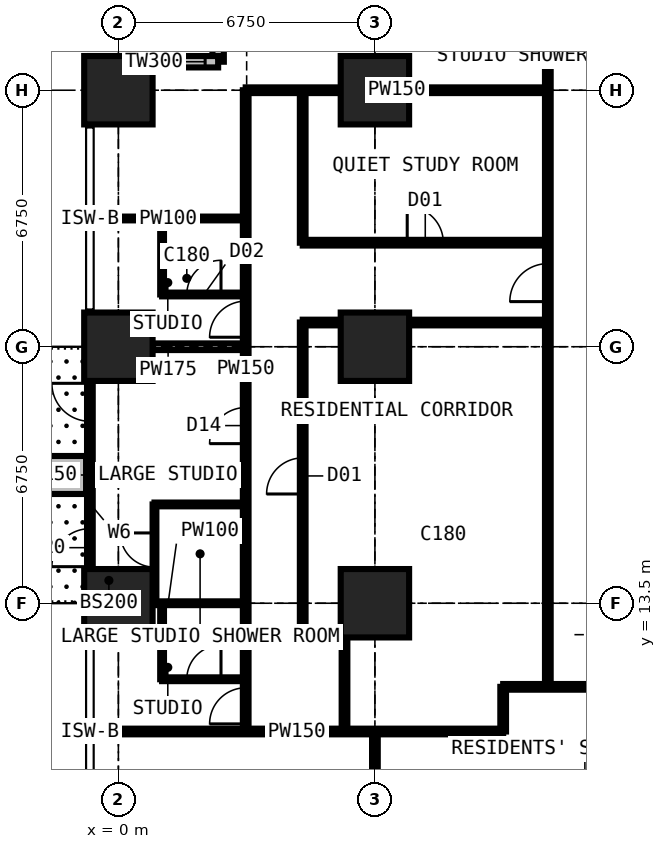
"""IFC4 building model, lengths in metres.
Left out: names, types, materials, properties, quantities, classifications, styles, units other than length and angle.
Written with IfcOpenShell. Run it as: python <this file> out.ifc"""

import sys

from ifc_helpers import new_model, si_unit, direction, frame, frame_2d, origin, origin_2d, place, context, subcontext, project, spatial, rectangle, extrude, element, fill, save


model = new_model("IFC4")
c1 = context("Model", 3, precision=1e-05, world=origin(), true_north=direction((0.0, 1.0)))
c2 = subcontext(c1, "Body", "Model", "MODEL_VIEW")
j1 = project(units=[si_unit("LENGTHUNIT", "METRE"), si_unit("PLANEANGLEUNIT", "RADIAN")], contexts=[c1])
p1 = place(None, origin())
s1 = spatial("IfcSite", under=j1, at=p1, CompositionType="ELEMENT")
p2 = place(p1, origin())
s2 = spatial("IfcBuilding", under=s1, at=p2, CompositionType="ELEMENT")
p3 = place(p2, frame((0.0, 0.0, 87.3)))
s3 = spatial("IfcBuildingStorey", under=s2, at=p3, CompositionType="ELEMENT", Elevation=87.3)
for number, where, z_axis, x_axis in (
    (1, (0.0, 13.5, 0.0), (0.0, 0.0, 1.0), (1.0, 0.0, 0.0)),
    (2, (0.0, 20.25, 0.0), (0.0, 0.0, 1.0), (1.0, 0.0, 0.0)),
    (3, (0.0, 27.0, 0.0), (0.0, 0.0, 1.0), (1.0, 0.0, 0.0)),
    (4, (6.75, 13.5, 0.0), (0.0, 0.0, 1.0), (1.0, 0.0, 0.0)),
    (5, (6.75, 20.25, 0.0), (0.0, 0.0, 1.0), (1.0, 0.0, 0.0)),
    (6, (6.75, 27.0, 0.0), (0.0, 0.0, 1.0), (1.0, 0.0, 0.0)),
):
    element("IfcColumn", number, at=place(p3, frame(where, z_axis=z_axis, x_axis=x_axis)), inside=s3, PredefinedType="COLUMN", context=c2, shape_type="SweptSolid", body=[
        extrude(rectangle(XDim=1.8, YDim=1.8, at=origin_2d()), origin(), (0.0, 0.0, 1.0), 3.6),
    ])
p4 = place(p3, frame((2.625, 31.125, 0.0), z_axis=(0.0, 0.0, 1.0), x_axis=(0.0, -1.0, 0.0)))
e7 = element("IfcWall", 7, at=p4, inside=s3, PredefinedType="SOLIDWALL", context=c2, shape_type="SweptSolid", body=[
    extrude(rectangle(XDim=3.375, YDim=0.3, at=frame_2d((1.688, 0.0))), origin(), (0.0, 0.0, 1.0), 3.375),
])
p5 = place(p4, frame((0.788, 0.0, 0.6)))
e8 = element("IfcOpeningElement", 8, at=p5, cuts=e7, PredefinedType="OPENING", context=c2, shape_type="SweptSolid", body=[
    extrude(rectangle(XDim=1.8, YDim=2.1, at=frame_2d((0.9, 1.05))), frame((0.0, 0.16, 0.0), z_axis=(0.0, -1.0, 0.0), x_axis=(1.0, 0.0, 0.0)), (0.0, 0.0, 1.0), 0.32),
])
p6 = place(p3, frame((2.625, 27.75, 0.0), z_axis=(0.0, 0.0, 1.0), x_axis=(-1.0, 0.0, 0.0)))
e9 = element("IfcWall", 9, at=p6, inside=s3, PredefinedType="SOLIDWALL", context=c2, shape_type="SweptSolid", body=[
    extrude(rectangle(XDim=3.375, YDim=0.3, at=frame_2d((1.688, 0.0))), origin(), (0.0, 0.0, 1.0), 3.375),
])
p7 = place(p6, frame((0.343, 0.0, 0.9)))
e10 = element("IfcOpeningElement", 10, at=p7, cuts=e9, PredefinedType="OPENING", context=c2, shape_type="SweptSolid", body=[
    extrude(rectangle(XDim=1.2, YDim=1.8, at=frame_2d((0.6, 0.9))), frame((0.0, 0.16, 0.0), z_axis=(0.0, -1.0, 0.0), x_axis=(1.0, 0.0, 0.0)), (0.0, 0.0, 1.0), 0.32),
])
p8 = place(p3, frame((-0.75, 13.5, 0.0), z_axis=(0.0, 0.0, 1.0), x_axis=(0.0, 1.0, 0.0)))
e11 = element("IfcWall", 11, at=p8, inside=s3, PredefinedType="SOLIDWALL", context=c2, shape_type="SweptSolid", body=[
    extrude(rectangle(XDim=6.75, YDim=0.15, at=frame_2d((3.375, 0.0))), origin(), (0.0, 0.0, 1.0), 3.375),
])
p9 = place(p8, frame((0.962, 0.0, 0.0)))
e12 = element("IfcOpeningElement", 12, at=p9, cuts=e11, PredefinedType="OPENING", context=c2, shape_type="SweptSolid", body=[
    extrude(rectangle(XDim=1.0, YDim=2.2, at=frame_2d((0.5, 1.1))), frame((0.0, 0.085, 0.0), z_axis=(0.0, -1.0, 0.0), x_axis=(1.0, 0.0, 0.0)), (0.0, 0.0, 1.0), 0.17),
])
p10 = place(p8, frame((2.025, 0.0, 0.9)))
e13 = element("IfcOpeningElement", 13, at=p10, cuts=e11, PredefinedType="OPENING", context=c2, shape_type="SweptSolid", body=[
    extrude(rectangle(XDim=1.2, YDim=1.8, at=frame_2d((0.6, 0.9))), frame((0.0, 0.085, 0.0), z_axis=(0.0, -1.0, 0.0), x_axis=(1.0, 0.0, 0.0)), (0.0, 0.0, 1.0), 0.17),
])
p11 = place(p8, frame((4.788, 0.0, 0.0)))
e14 = element("IfcOpeningElement", 14, at=p11, cuts=e11, PredefinedType="OPENING", context=c2, shape_type="SweptSolid", body=[
    extrude(rectangle(XDim=1.0, YDim=2.2, at=frame_2d((0.5, 1.1))), frame((0.0, 0.085, 0.0), z_axis=(0.0, -1.0, 0.0), x_axis=(1.0, 0.0, 0.0)), (0.0, 0.0, 1.0), 0.17),
])
p12 = place(p8, frame((3.525, 0.0, 0.9)))
e15 = element("IfcOpeningElement", 15, at=p12, cuts=e11, PredefinedType="OPENING", context=c2, shape_type="SweptSolid", body=[
    extrude(rectangle(XDim=1.2, YDim=1.8, at=frame_2d((0.6, 0.9))), frame((0.0, 0.085, 0.0), z_axis=(0.0, -1.0, 0.0), x_axis=(1.0, 0.0, 0.0)), (0.0, 0.0, 1.0), 0.17),
])
p13 = place(p3, frame((-0.85, 16.875, 0.0), z_axis=(0.0, 0.0, 1.0), x_axis=(-1.0, 0.0, 0.0)))
e16 = element("IfcWall", 16, at=p13, inside=s3, PredefinedType="USERDEFINED", context=c2, shape_type="SweptSolid", body=[
    extrude(rectangle(XDim=2.2, YDim=1.0, at=frame_2d((1.1, 0.0))), origin(), (0.0, 0.0, 1.0), 0.9),
])
p14 = place(p3, frame((-0.734, 10.125, 0.0), z_axis=(0.0, 0.0, 1.0), x_axis=(1.0, 0.0, 0.0)))
e17 = element("IfcWall", 17, at=p14, inside=s3, PredefinedType="PARTITIONING", context=c2, shape_type="SweptSolid", body=[
    extrude(rectangle(XDim=10.859, YDim=0.15, at=frame_2d((5.429, 0.0))), origin(), (0.0, 0.0, 1.0), 3.375),
])
p15 = place(p3, frame((-0.734, 13.5, 0.0), z_axis=(0.0, 0.0, 1.0), x_axis=(1.0, 0.0, 0.0)))
e18 = element("IfcWall", 18, at=p15, inside=s3, PredefinedType="PARTITIONING", context=c2, shape_type="SweptSolid", body=[
    extrude(rectangle(XDim=4.084, YDim=0.1, at=frame_2d((2.042, 0.0))), origin(), (0.0, 0.0, 1.0), 2.877),
])
p16 = place(p3, frame((-0.734, 20.25, 0.0), z_axis=(0.0, 0.0, 1.0), x_axis=(1.0, 0.0, 0.0)))
e19 = element("IfcWall", 19, at=p16, inside=s3, PredefinedType="PARTITIONING", context=c2, shape_type="SweptSolid", body=[
    extrude(rectangle(XDim=4.084, YDim=0.175, at=frame_2d((2.042, 0.0))), origin(), (0.0, 0.0, 1.0), 2.877),
])
p17 = place(p3, frame((-0.734, 23.625, 0.0), z_axis=(0.0, 0.0, 1.0), x_axis=(1.0, 0.0, 0.0)))
e20 = element("IfcWall", 20, at=p17, inside=s3, PredefinedType="PARTITIONING", context=c2, shape_type="SweptSolid", body=[
    extrude(rectangle(XDim=4.084, YDim=0.1, at=frame_2d((2.042, 0.0))), origin(), (0.0, 0.0, 1.0), 3.375),
])
p18 = place(p3, frame((0.95, 13.5, 0.0), z_axis=(0.0, 0.0, 1.0), x_axis=(0.0, 1.0, 0.0)))
e21 = element("IfcWall", 21, at=p18, inside=s3, PredefinedType="PARTITIONING", context=c2, shape_type="SweptSolid", body=[
    extrude(rectangle(XDim=2.6, YDim=0.1, at=frame_2d((1.3, 0.0))), origin(), (0.0, 0.0, 1.0), 3.375),
])
p19 = place(p18, frame((0.95, 0.0, 0.0)))
e22 = element("IfcOpeningElement", 22, at=p19, cuts=e21, PredefinedType="OPENING", context=c2, shape_type="SweptSolid", body=[
    extrude(rectangle(XDim=0.9, YDim=2.2, at=frame_2d((0.45, 1.1))), frame((0.0, 0.06, 0.0), z_axis=(0.0, -1.0, 0.0), x_axis=(1.0, 0.0, 0.0)), (0.0, 0.0, 1.0), 0.12),
])
p20 = place(p3, frame((0.95, 16.1, 0.0), z_axis=(0.0, 0.0, 1.0), x_axis=(1.0, 0.0, 0.0)))
e23 = element("IfcWall", 23, at=p20, inside=s3, PredefinedType="PARTITIONING", context=c2, shape_type="SweptSolid", body=[
    extrude(rectangle(XDim=2.4, YDim=0.1, at=frame_2d((1.2, 0.0))), origin(), (0.0, 0.0, 1.0), 3.375),
])
p21 = place(p3, frame((1.15, 11.5, 0.0), z_axis=(0.0, 0.0, 1.0), x_axis=(0.0, 1.0, 0.0)))
e24 = element("IfcWall", 24, at=p21, inside=s3, PredefinedType="PARTITIONING", context=c2, shape_type="SweptSolid", body=[
    extrude(rectangle(XDim=2.0, YDim=0.1, at=frame_2d((1.0, 0.0))), origin(), (0.0, 0.0, 1.0), 3.375),
])
p22 = place(p3, frame((1.15, 11.5, 0.0), z_axis=(0.0, 0.0, 1.0), x_axis=(1.0, 0.0, 0.0)))
e25 = element("IfcWall", 25, at=p22, inside=s3, PredefinedType="PARTITIONING", context=c2, shape_type="SweptSolid", body=[
    extrude(rectangle(XDim=2.2, YDim=0.1, at=frame_2d((1.1, 0.0))), origin(), (0.0, 0.0, 1.0), 3.375),
])
p23 = place(p22, frame((0.65, 0.0, 0.0)))
e26 = element("IfcOpeningElement", 26, at=p23, cuts=e25, PredefinedType="OPENING", context=c2, shape_type="SweptSolid", body=[
    extrude(rectangle(XDim=0.9, YDim=2.2, at=frame_2d((0.45, 1.1))), frame((0.0, 0.06, 0.0), z_axis=(0.0, -1.0, 0.0), x_axis=(1.0, 0.0, 0.0)), (0.0, 0.0, 1.0), 0.12),
])
p24 = place(p3, frame((1.15, 21.625, 0.0), z_axis=(0.0, 0.0, 1.0), x_axis=(0.0, 1.0, 0.0)))
e27 = element("IfcWall", 27, at=p24, inside=s3, PredefinedType="PARTITIONING", context=c2, shape_type="SweptSolid", body=[
    extrude(rectangle(XDim=2.0, YDim=0.1, at=frame_2d((1.0, 0.0))), origin(), (0.0, 0.0, 1.0), 3.375),
])
p25 = place(p3, frame((1.15, 21.625, 0.0), z_axis=(0.0, 0.0, 1.0), x_axis=(1.0, 0.0, 0.0)))
e28 = element("IfcWall", 28, at=p25, inside=s3, PredefinedType="PARTITIONING", context=c2, shape_type="SweptSolid", body=[
    extrude(rectangle(XDim=2.2, YDim=0.1, at=frame_2d((1.1, 0.0))), origin(), (0.0, 0.0, 1.0), 3.375),
])
p26 = place(p25, frame((0.65, 0.0, 0.0)))
e29 = element("IfcOpeningElement", 29, at=p26, cuts=e28, PredefinedType="OPENING", context=c2, shape_type="SweptSolid", body=[
    extrude(rectangle(XDim=0.9, YDim=2.2, at=frame_2d((0.45, 1.1))), frame((0.0, 0.06, 0.0), z_axis=(0.0, -1.0, 0.0), x_axis=(1.0, 0.0, 0.0)), (0.0, 0.0, 1.0), 0.12),
])
p27 = place(p3, frame((3.35, 10.125, 0.0), z_axis=(0.0, 0.0, 1.0), x_axis=(0.0, 1.0, 0.0)))
e30 = element("IfcWall", 30, at=p27, inside=s3, PredefinedType="PARTITIONING", context=c2, shape_type="SweptSolid", body=[
    extrude(rectangle(XDim=16.875, YDim=0.15, at=frame_2d((8.438, 0.0))), origin(), (0.0, 0.0, 1.0), 3.375),
])
p28 = place(p27, frame((7.575, 0.0, 0.0)))
e31 = element("IfcOpeningElement", 31, at=p28, cuts=e30, PredefinedType="OPENING", context=c2, shape_type="SweptSolid", body=[
    extrude(rectangle(XDim=0.95, YDim=2.2, at=frame_2d((0.475, 1.1))), frame((0.0, 0.085, 0.0), z_axis=(0.0, -1.0, 0.0), x_axis=(1.0, 0.0, 0.0)), (0.0, 0.0, 1.0), 0.17),
])
p29 = place(p27, frame((0.2, 0.0, 0.0)))
e32 = element("IfcOpeningElement", 32, at=p29, cuts=e30, PredefinedType="OPENING", context=c2, shape_type="SweptSolid", body=[
    extrude(rectangle(XDim=0.95, YDim=2.2, at=frame_2d((0.475, 1.1))), frame((0.0, 0.085, 0.0), z_axis=(0.0, -1.0, 0.0), x_axis=(1.0, 0.0, 0.0)), (0.0, 0.0, 1.0), 0.17),
])
p30 = place(p27, frame((10.375, 0.0, 0.0)))
e33 = element("IfcOpeningElement", 33, at=p30, cuts=e30, PredefinedType="OPENING", context=c2, shape_type="SweptSolid", body=[
    extrude(rectangle(XDim=0.95, YDim=2.2, at=frame_2d((0.475, 1.1))), frame((0.0, 0.085, 0.0), z_axis=(0.0, -1.0, 0.0), x_axis=(1.0, 0.0, 0.0)), (0.0, 0.0, 1.0), 0.17),
])
p31 = place(p3, frame((3.35, 27.0, 0.0), z_axis=(0.0, 0.0, 1.0), x_axis=(1.0, 0.0, 0.0)))
e34 = element("IfcWall", 34, at=p31, inside=s3, PredefinedType="PARTITIONING", context=c2, shape_type="SweptSolid", body=[
    extrude(rectangle(XDim=7.95, YDim=0.15, at=frame_2d((3.975, 0.0))), origin(), (0.0, 0.0, 1.0), 2.806),
])
p32 = place(p3, frame((4.85, 12.775, 0.0), z_axis=(0.0, 0.0, 1.0), x_axis=(0.0, 1.0, 0.0)))
e35 = element("IfcWall", 35, at=p32, inside=s3, PredefinedType="PARTITIONING", context=c2, shape_type="SweptSolid", body=[
    extrude(rectangle(XDim=8.113, YDim=0.15, at=frame_2d((4.056, 0.0))), origin(), (0.0, 0.0, 1.0), 3.375),
])
p33 = place(p32, frame((3.6, 0.0, 0.0)))
e36 = element("IfcOpeningElement", 36, at=p33, cuts=e35, PredefinedType="OPENING", context=c2, shape_type="SweptSolid", body=[
    extrude(rectangle(XDim=0.95, YDim=2.2, at=frame_2d((0.475, 1.1))), frame((0.0, 0.085, 0.0), z_axis=(0.0, -1.0, 0.0), x_axis=(1.0, 0.0, 0.0)), (0.0, 0.0, 1.0), 0.17),
])
p34 = place(p3, frame((4.85, 12.775, 0.0), z_axis=(0.0, 0.0, 1.0), x_axis=(1.0, 0.0, 0.0)))
e37 = element("IfcWall", 37, at=p34, inside=s3, PredefinedType="PARTITIONING", context=c2, shape_type="SweptSolid", body=[
    extrude(rectangle(XDim=1.1, YDim=0.15, at=frame_2d((0.55, 0.0))), origin(), (0.0, 0.0, 1.0), 3.375),
])
p35 = place(p3, frame((4.85, 20.887, 0.0), z_axis=(0.0, 0.0, 1.0), x_axis=(1.0, 0.0, 0.0)))
e38 = element("IfcWall", 38, at=p35, inside=s3, PredefinedType="PARTITIONING", context=c2, shape_type="SweptSolid", body=[
    extrude(rectangle(XDim=6.45, YDim=0.15, at=frame_2d((3.225, 0.0))), origin(), (0.0, 0.0, 1.0), 3.375),
])
p36 = place(p3, frame((4.85, 22.988, 0.0), z_axis=(0.0, 0.0, 1.0), x_axis=(0.0, 1.0, 0.0)))
e39 = element("IfcWall", 39, at=p36, inside=s3, PredefinedType="PARTITIONING", context=c2, shape_type="SweptSolid", body=[
    extrude(rectangle(XDim=4.012, YDim=0.15, at=frame_2d((2.006, 0.0))), origin(), (0.0, 0.0, 1.0), 3.375),
])
p37 = place(p3, frame((4.85, 22.988, 0.0), z_axis=(0.0, 0.0, 1.0), x_axis=(1.0, 0.0, 0.0)))
e40 = element("IfcWall", 40, at=p37, inside=s3, PredefinedType="PARTITIONING", context=c2, shape_type="SweptSolid", body=[
    extrude(rectangle(XDim=6.45, YDim=0.15, at=frame_2d((3.225, 0.0))), origin(), (0.0, 0.0, 1.0), 3.375),
])
p38 = place(p37, frame((2.75, 0.0, 0.0)))
e41 = element("IfcOpeningElement", 41, at=p38, cuts=e40, PredefinedType="OPENING", context=c2, shape_type="SweptSolid", body=[
    extrude(rectangle(XDim=0.95, YDim=2.2, at=frame_2d((0.475, 1.1))), frame((0.0, 0.085, 0.0), z_axis=(0.0, -1.0, 0.0), x_axis=(1.0, 0.0, 0.0)), (0.0, 0.0, 1.0), 0.17),
])
p39 = place(p3, frame((5.95, 10.125, 0.0), z_axis=(0.0, 0.0, 1.0), x_axis=(0.0, 1.0, 0.0)))
e42 = element("IfcWall", 42, at=p39, inside=s3, PredefinedType="PARTITIONING", context=c2, shape_type="SweptSolid", body=[
    extrude(rectangle(XDim=2.65, YDim=0.15, at=frame_2d((1.325, 0.0))), origin(), (0.0, 0.0, 1.0), 3.375),
])
p40 = place(p3, frame((6.75, 3.35, 0.0), z_axis=(0.0, 0.0, 1.0), x_axis=(0.0, 1.0, 0.0)))
e43 = element("IfcWall", 43, at=p40, inside=s3, PredefinedType="PARTITIONING", context=c2, shape_type="SweptSolid", body=[
    extrude(rectangle(XDim=6.775, YDim=0.15, at=frame_2d((3.387, 0.0))), origin(), (0.0, 0.0, 1.0), 2.877),
])
p41 = place(p3, frame((10.125, 10.125, 0.0), z_axis=(0.0, 0.0, 1.0), x_axis=(0.0, 1.0, 0.0)))
e44 = element("IfcWall", 44, at=p41, inside=s3, PredefinedType="PARTITIONING", context=c2, shape_type="SweptSolid", body=[
    extrude(rectangle(XDim=1.175, YDim=0.15, at=frame_2d((0.587, 0.0))), origin(), (0.0, 0.0, 1.0), 3.375),
])
p42 = place(p3, frame((10.125, 11.3, 0.0), z_axis=(0.0, 0.0, 1.0), x_axis=(1.0, 0.0, 0.0)))
e45 = element("IfcWall", 45, at=p42, inside=s3, PredefinedType="PARTITIONING", context=c2, shape_type="SweptSolid", body=[
    extrude(rectangle(XDim=20.675, YDim=0.15, at=frame_2d((10.337, 0.0))), origin(), (0.0, 0.0, 1.0), 3.375),
])
p43 = place(p42, frame((8.375, 0.0, 0.0)))
e46 = element("IfcOpeningElement", 46, at=p43, cuts=e45, PredefinedType="OPENING", context=c2, shape_type="SweptSolid", body=[
    extrude(rectangle(XDim=1.0, YDim=2.2, at=frame_2d((0.5, 1.1))), frame((0.0, 0.085, 0.0), z_axis=(0.0, -1.0, 0.0), x_axis=(1.0, 0.0, 0.0)), (0.0, 0.0, 1.0), 0.17),
])
p44 = place(p42, frame((10.975, 0.0, 0.0)))
e47 = element("IfcOpeningElement", 47, at=p44, cuts=e45, PredefinedType="OPENING", context=c2, shape_type="SweptSolid", body=[
    extrude(rectangle(XDim=1.0, YDim=2.2, at=frame_2d((0.5, 1.1))), frame((0.0, 0.085, 0.0), z_axis=(0.0, -1.0, 0.0), x_axis=(1.0, 0.0, 0.0)), (0.0, 0.0, 1.0), 0.17),
])
p45 = place(p42, frame((3.925, 0.0, 0.0)))
e48 = element("IfcOpeningElement", 48, at=p45, cuts=e45, PredefinedType="OPENING", context=c2, shape_type="SweptSolid", body=[
    extrude(rectangle(XDim=0.95, YDim=2.2, at=frame_2d((0.475, 1.1))), frame((0.0, 0.085, 0.0), z_axis=(0.0, -1.0, 0.0), x_axis=(1.0, 0.0, 0.0)), (0.0, 0.0, 1.0), 0.17),
])
p46 = place(p3, frame((11.3, 11.3, 0.0), z_axis=(0.0, 0.0, 1.0), x_axis=(0.0, 1.0, 0.0)))
e49 = element("IfcWall", 49, at=p46, inside=s3, PredefinedType="PARTITIONING", context=c2, shape_type="SweptSolid", body=[
    extrude(rectangle(XDim=19.3, YDim=0.15, at=frame_2d((9.65, 0.0))), origin(), (0.0, 0.0, 1.0), 3.375),
])
p47 = place(p46, frame((18.1, 0.0, 0.0)))
e50 = element("IfcOpeningElement", 50, at=p47, cuts=e49, PredefinedType="OPENING", context=c2, shape_type="SweptSolid", body=[
    extrude(rectangle(XDim=1.0, YDim=2.2, at=frame_2d((0.5, 1.1))), frame((0.0, 0.085, 0.0), z_axis=(0.0, -1.0, 0.0), x_axis=(1.0, 0.0, 0.0)), (0.0, 0.0, 1.0), 0.17),
])
p48 = place(p46, frame((10.137, 0.0, 0.0)))
e51 = element("IfcOpeningElement", 51, at=p48, cuts=e49, PredefinedType="OPENING", context=c2, shape_type="SweptSolid", body=[
    extrude(rectangle(XDim=1.0, YDim=2.2, at=frame_2d((0.5, 1.1))), frame((0.0, 0.085, 0.0), z_axis=(0.0, -1.0, 0.0), x_axis=(1.0, 0.0, 0.0)), (0.0, 0.0, 1.0), 0.17),
])
p49 = place(p7, origin())
e52 = element("IfcWindow", 52, at=p49, inside=s3, PartitioningType="SINGLE_PANEL", PredefinedType="WINDOW", context=c2, shape_type="SweptSolid", body=[
    extrude(rectangle(XDim=1.2, YDim=1.8, at=frame_2d((0.6, 0.9))), frame((0.0, 0.03, 0.0), z_axis=(0.0, -1.0, 0.0), x_axis=(1.0, 0.0, 0.0)), (0.0, 0.0, 1.0), 0.06),
])
fill(e10, e52)
p50 = place(p9, origin())
e53 = element("IfcDoor", 53, at=p50, inside=s3, OperationType="SINGLE_SWING_LEFT", PredefinedType="DOOR", context=c2, shape_type="SweptSolid", body=[
    extrude(rectangle(XDim=1.0, YDim=2.2, at=frame_2d((0.5, 1.1))), frame((0.0, 0.025, 0.0), z_axis=(0.0, -1.0, 0.0), x_axis=(1.0, 0.0, 0.0)), (0.0, 0.0, 1.0), 0.05),
])
fill(e12, e53)
p51 = place(p10, origin())
e54 = element("IfcWindow", 54, at=p51, inside=s3, PartitioningType="SINGLE_PANEL", PredefinedType="WINDOW", context=c2, shape_type="SweptSolid", body=[
    extrude(rectangle(XDim=1.2, YDim=1.8, at=frame_2d((0.6, 0.9))), frame((0.0, 0.03, 0.0), z_axis=(0.0, -1.0, 0.0), x_axis=(1.0, 0.0, 0.0)), (0.0, 0.0, 1.0), 0.06),
])
fill(e13, e54)
p52 = place(p11, origin())
e55 = element("IfcDoor", 55, at=p52, inside=s3, OperationType="SINGLE_SWING_RIGHT", PredefinedType="DOOR", context=c2, shape_type="SweptSolid", body=[
    extrude(rectangle(XDim=1.0, YDim=2.2, at=frame_2d((0.5, 1.1))), frame((0.0, 0.025, 0.0), z_axis=(0.0, -1.0, 0.0), x_axis=(1.0, 0.0, 0.0)), (0.0, 0.0, 1.0), 0.05),
])
fill(e14, e55)
p53 = place(p12, origin())
e56 = element("IfcWindow", 56, at=p53, inside=s3, PartitioningType="SINGLE_PANEL", PredefinedType="WINDOW", context=c2, shape_type="SweptSolid", body=[
    extrude(rectangle(XDim=1.2, YDim=1.8, at=frame_2d((0.6, 0.9))), frame((0.0, 0.03, 0.0), z_axis=(0.0, -1.0, 0.0), x_axis=(1.0, 0.0, 0.0)), (0.0, 0.0, 1.0), 0.06),
])
fill(e15, e56)
p54 = place(p28, origin())
e57 = element("IfcDoor", 57, at=p54, inside=s3, OperationType="SINGLE_SWING_LEFT", PredefinedType="DOOR", context=c2, shape_type="SweptSolid", body=[
    extrude(rectangle(XDim=0.95, YDim=2.2, at=frame_2d((0.475, 1.1))), frame((0.0, 0.025, 0.0), z_axis=(0.0, -1.0, 0.0), x_axis=(1.0, 0.0, 0.0)), (0.0, 0.0, 1.0), 0.05),
])
fill(e31, e57)
p55 = place(p19, origin())
e58 = element("IfcDoor", 58, at=p55, inside=s3, OperationType="SINGLE_SWING_RIGHT", PredefinedType="DOOR", context=c2, shape_type="SweptSolid", body=[
    extrude(rectangle(XDim=0.9, YDim=2.2, at=frame_2d((0.45, 1.1))), frame((0.0, 0.025, 0.0), z_axis=(0.0, -1.0, 0.0), x_axis=(1.0, 0.0, 0.0)), (0.0, 0.0, 1.0), 0.05),
])
fill(e22, e58)
p56 = place(p29, origin())
e59 = element("IfcDoor", 59, at=p56, inside=s3, OperationType="SINGLE_SWING_LEFT", PredefinedType="DOOR", context=c2, shape_type="SweptSolid", body=[
    extrude(rectangle(XDim=0.95, YDim=2.2, at=frame_2d((0.475, 1.1))), frame((0.0, 0.025, 0.0), z_axis=(0.0, -1.0, 0.0), x_axis=(1.0, 0.0, 0.0)), (0.0, 0.0, 1.0), 0.05),
])
fill(e32, e59)
p57 = place(p23, origin())
e60 = element("IfcDoor", 60, at=p57, inside=s3, OperationType="SINGLE_SWING_RIGHT", PredefinedType="DOOR", context=c2, shape_type="SweptSolid", body=[
    extrude(rectangle(XDim=0.9, YDim=2.2, at=frame_2d((0.45, 1.1))), frame((0.0, 0.025, 0.0), z_axis=(0.0, -1.0, 0.0), x_axis=(1.0, 0.0, 0.0)), (0.0, 0.0, 1.0), 0.05),
])
fill(e26, e60)
p58 = place(p30, origin())
e61 = element("IfcDoor", 61, at=p58, inside=s3, OperationType="SINGLE_SWING_LEFT", PredefinedType="DOOR", context=c2, shape_type="SweptSolid", body=[
    extrude(rectangle(XDim=0.95, YDim=2.2, at=frame_2d((0.475, 1.1))), frame((0.0, 0.025, 0.0), z_axis=(0.0, -1.0, 0.0), x_axis=(1.0, 0.0, 0.0)), (0.0, 0.0, 1.0), 0.05),
])
fill(e33, e61)
p59 = place(p26, origin())
e62 = element("IfcDoor", 62, at=p59, inside=s3, OperationType="SINGLE_SWING_RIGHT", PredefinedType="DOOR", context=c2, shape_type="SweptSolid", body=[
    extrude(rectangle(XDim=0.9, YDim=2.2, at=frame_2d((0.45, 1.1))), frame((0.0, 0.025, 0.0), z_axis=(0.0, -1.0, 0.0), x_axis=(1.0, 0.0, 0.0)), (0.0, 0.0, 1.0), 0.05),
])
fill(e29, e62)
p60 = place(p48, origin())
e63 = element("IfcDoor", 63, at=p60, inside=s3, OperationType="SINGLE_SWING_LEFT", PredefinedType="DOOR", context=c2, shape_type="SweptSolid", body=[
    extrude(rectangle(XDim=1.0, YDim=2.2, at=frame_2d((0.5, 1.1))), frame((0.0, 0.025, 0.0), z_axis=(0.0, -1.0, 0.0), x_axis=(1.0, 0.0, 0.0)), (0.0, 0.0, 1.0), 0.05),
])
fill(e51, e63)
p61 = place(p33, origin())
e64 = element("IfcDoor", 64, at=p61, inside=s3, OperationType="SINGLE_SWING_LEFT", PredefinedType="DOOR", context=c2, shape_type="SweptSolid", body=[
    extrude(rectangle(XDim=0.95, YDim=2.2, at=frame_2d((0.475, 1.1))), frame((0.0, 0.025, 0.0), z_axis=(0.0, -1.0, 0.0), x_axis=(1.0, 0.0, 0.0)), (0.0, 0.0, 1.0), 0.05),
])
fill(e36, e64)
p62 = place(p38, origin())
e65 = element("IfcDoor", 65, at=p62, inside=s3, OperationType="SINGLE_SWING_LEFT", PredefinedType="DOOR", context=c2, shape_type="SweptSolid", body=[
    extrude(rectangle(XDim=0.95, YDim=2.2, at=frame_2d((0.475, 1.1))), frame((0.0, 0.025, 0.0), z_axis=(0.0, -1.0, 0.0), x_axis=(1.0, 0.0, 0.0)), (0.0, 0.0, 1.0), 0.05),
])
fill(e41, e65)
save(model, sys.argv[1])
